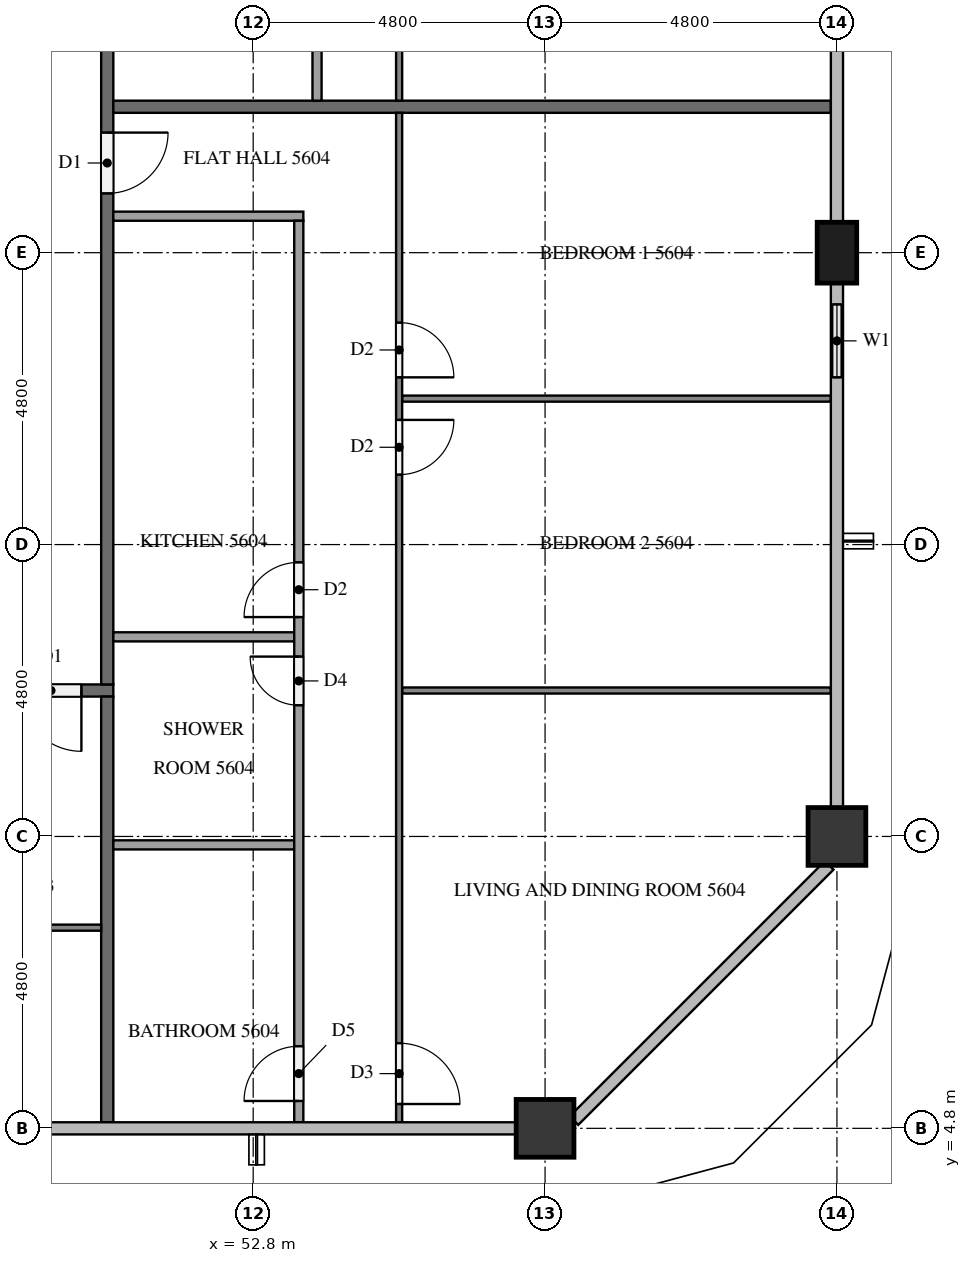
"""IFC4 building model, lengths in metres.
Left out: names, types, materials, properties, quantities, classifications, styles, units other than length and angle.
Written with IfcOpenShell. Run it as: python <this file> out.ifc"""

import sys

from ifc_helpers import new_model, si_unit, direction, frame, frame_2d, origin, origin_2d, place, context, subcontext, project, spatial, rectangle, extrude, element, fill, save


model = new_model("IFC4")
c1 = context("Model", 3, precision=1e-05, world=origin(), true_north=direction((0.0, 1.0)))
c2 = subcontext(c1, "Body", "Model", "MODEL_VIEW")
j1 = project(units=[si_unit("LENGTHUNIT", "METRE"), si_unit("PLANEANGLEUNIT", "RADIAN")], contexts=[c1])
p1 = place(None, origin())
s1 = spatial("IfcSite", under=j1, at=p1, CompositionType="ELEMENT")
p2 = place(p1, origin())
s2 = spatial("IfcBuilding", under=s1, at=p2, CompositionType="ELEMENT")
p3 = place(p2, frame((0.0, 0.0, 215.8)))
s3 = spatial("IfcBuildingStorey", under=s2, at=p3, CompositionType="ELEMENT", Elevation=215.8)
for number, where, z_axis, x_axis in (
    (1, (57.6, 4.8, 0.0), (0.0, 0.0, 1.0), (1.0, 0.0, 0.0)),
    (2, (62.4, 9.6, 0.0), (0.0, 0.0, 1.0), (1.0, 0.0, 0.0)),
):
    element("IfcColumn", number, at=place(p3, frame(where, z_axis=z_axis, x_axis=x_axis)), inside=s3, PredefinedType="COLUMN", context=c2, shape_type="SweptSolid", body=[
        extrude(rectangle(XDim=0.95, YDim=0.95, at=origin_2d()), origin(), (0.0, 0.0, 1.0), 3.2),
    ])
p4 = place(p3, frame((62.4, 19.2, 0.0), z_axis=(0.0, 0.0, 1.0), x_axis=(0.0, 1.0, 0.0)))
e3 = element("IfcColumn", 3, at=p4, inside=s3, PredefinedType="COLUMN", context=c2, shape_type="SweptSolid", body=[
    extrude(rectangle(XDim=1.0, YDim=0.65, at=origin_2d()), origin(), (0.0, 0.0, 1.0), 3.2),
])
p5 = place(p3, frame((62.4, 16.8, 0.0), z_axis=(0.0, 0.0, 1.0), x_axis=(0.0, 1.0, 0.0)))
e4 = element("IfcWall", 4, at=p5, inside=s3, PredefinedType="SOLIDWALL", context=c2, shape_type="SweptSolid", body=[
    extrude(rectangle(XDim=1.9, YDim=0.15, at=frame_2d((0.95, 0.0))), origin(), (0.0, 0.0, 1.0), 3.2),
])
p6 = place(p5, frame((0.35, 0.0, 0.9)))
e5 = element("IfcOpeningElement", 5, at=p6, cuts=e4, PredefinedType="OPENING", context=c2, shape_type="SweptSolid", body=[
    extrude(rectangle(XDim=1.2, YDim=1.4, at=frame_2d((0.6, 0.7))), frame((0.0, 0.085, 0.0), z_axis=(0.0, -1.0, 0.0), x_axis=(1.0, 0.0, 0.0)), (0.0, 0.0, 1.0), 0.17),
])
p7 = place(p3, frame((50.5, 12.0, 0.0), z_axis=(0.0, 0.0, 1.0), x_axis=(-1.0, 0.0, 0.0)))
e6 = element("IfcWall", 6, at=p7, inside=s3, PredefinedType="PARTITIONING", context=c2, shape_type="SweptSolid", body=[
    extrude(rectangle(XDim=38.6, YDim=0.2, at=frame_2d((19.3, 0.0))), origin(), (0.0, 0.0, 1.0), 3.2),
])
p8 = place(p7, frame((37.075, 0.0, 0.0)))
e7 = element("IfcOpeningElement", 7, at=p8, cuts=e6, PredefinedType="OPENING", context=c2, shape_type="SweptSolid", body=[
    extrude(rectangle(XDim=1.0, YDim=2.1, at=frame_2d((0.5, 1.05))), frame((0.0, 0.11, 0.0), z_axis=(0.0, -1.0, 0.0), x_axis=(1.0, 0.0, 0.0)), (0.0, 0.0, 1.0), 0.22),
])
p9 = place(p7, frame((20.275, 0.0, 0.0)))
e8 = element("IfcOpeningElement", 8, at=p9, cuts=e6, PredefinedType="OPENING", context=c2, shape_type="SweptSolid", body=[
    extrude(rectangle(XDim=1.0, YDim=2.1, at=frame_2d((0.5, 1.05))), frame((0.0, 0.11, 0.0), z_axis=(0.0, -1.0, 0.0), x_axis=(1.0, 0.0, 0.0)), (0.0, 0.0, 1.0), 0.22),
])
p10 = place(p7, frame((0.525, 0.0, 0.0)))
e9 = element("IfcOpeningElement", 9, at=p10, cuts=e6, PredefinedType="OPENING", context=c2, shape_type="SweptSolid", body=[
    extrude(rectangle(XDim=1.0, YDim=2.1, at=frame_2d((0.5, 1.05))), frame((0.0, 0.11, 0.0), z_axis=(0.0, -1.0, 0.0), x_axis=(1.0, 0.0, 0.0)), (0.0, 0.0, 1.0), 0.22),
])
p11 = place(p3, frame((50.4, 40.7, 0.0), z_axis=(0.0, 0.0, 1.0), x_axis=(0.0, -1.0, 0.0)))
e10 = element("IfcWall", 10, at=p11, inside=s3, PredefinedType="PARTITIONING", context=c2, shape_type="SweptSolid", body=[
    extrude(rectangle(XDim=28.6, YDim=0.2, at=frame_2d((14.3, 0.0))), origin(), (0.0, 0.0, 1.0), 3.2),
])
p12 = place(p11, frame((19.525, 0.0, 0.0)))
e11 = element("IfcOpeningElement", 11, at=p12, cuts=e10, PredefinedType="OPENING", context=c2, shape_type="SweptSolid", body=[
    extrude(rectangle(XDim=1.0, YDim=2.1, at=frame_2d((0.5, 1.05))), frame((0.0, 0.11, 0.0), z_axis=(0.0, -1.0, 0.0), x_axis=(1.0, 0.0, 0.0)), (0.0, 0.0, 1.0), 0.22),
])
p13 = place(p11, frame((7.525, 0.0, 0.0)))
e12 = element("IfcOpeningElement", 12, at=p13, cuts=e10, PredefinedType="OPENING", context=c2, shape_type="SweptSolid", body=[
    extrude(rectangle(XDim=1.0, YDim=2.1, at=frame_2d((0.5, 1.05))), frame((0.0, 0.11, 0.0), z_axis=(0.0, -1.0, 0.0), x_axis=(1.0, 0.0, 0.0)), (0.0, 0.0, 1.0), 0.22),
])
p14 = place(p11, frame((0.325, 0.0, 0.0)))
e13 = element("IfcOpeningElement", 13, at=p14, cuts=e10, PredefinedType="OPENING", context=c2, shape_type="SweptSolid", body=[
    extrude(rectangle(XDim=1.0, YDim=2.1, at=frame_2d((0.5, 1.05))), frame((0.0, 0.11, 0.0), z_axis=(0.0, -1.0, 0.0), x_axis=(1.0, 0.0, 0.0)), (0.0, 0.0, 1.0), 0.22),
])
p15 = place(p3, frame((50.4, 11.9, 0.0), z_axis=(0.0, 0.0, 1.0), x_axis=(0.0, -1.0, 0.0)))
e14 = element("IfcWall", 14, at=p15, inside=s3, PredefinedType="PARTITIONING", context=c2, shape_type="SweptSolid", body=[
    extrude(rectangle(XDim=7.0, YDim=0.2, at=frame_2d((3.5, 0.0))), origin(), (0.0, 0.0, 1.0), 3.2),
])
p16 = place(p3, frame((50.5, 21.6, 0.0), z_axis=(0.0, 0.0, 1.0), x_axis=(1.0, 0.0, 0.0)))
e15 = element("IfcWall", 15, at=p16, inside=s3, PredefinedType="PARTITIONING", context=c2, shape_type="SweptSolid", body=[
    extrude(rectangle(XDim=11.8, YDim=0.2, at=frame_2d((5.9, 0.0))), origin(), (0.0, 0.0, 1.0), 3.2),
])
p17 = place(p3, frame((50.3, 8.1, 0.0), z_axis=(0.0, 0.0, 1.0), x_axis=(-1.0, 0.0, 0.0)))
e16 = element("IfcWall", 16, at=p17, inside=s3, PredefinedType="PARTITIONING", context=c2, shape_type="SweptSolid", body=[
    extrude(rectangle(XDim=9.4, YDim=0.1, at=frame_2d((4.7, 0.0))), origin(), (0.0, 0.0, 1.0), 3.2),
])
p18 = place(p17, frame((3.35, 0.0, 0.0)))
e17 = element("IfcOpeningElement", 17, at=p18, cuts=e16, PredefinedType="OPENING", context=c2, shape_type="SweptSolid", body=[
    extrude(rectangle(XDim=1.0, YDim=2.1, at=frame_2d((0.5, 1.05))), frame((0.0, 0.06, 0.0), z_axis=(0.0, -1.0, 0.0), x_axis=(1.0, 0.0, 0.0)), (0.0, 0.0, 1.0), 0.12),
])
p19 = place(p17, frame((5.05, 0.0, 0.0)))
e18 = element("IfcOpeningElement", 18, at=p19, cuts=e16, PredefinedType="OPENING", context=c2, shape_type="SweptSolid", body=[
    extrude(rectangle(XDim=0.9, YDim=2.1, at=frame_2d((0.45, 1.05))), frame((0.0, 0.06, 0.0), z_axis=(0.0, -1.0, 0.0), x_axis=(1.0, 0.0, 0.0)), (0.0, 0.0, 1.0), 0.12),
])
for number, where, z_axis, x_axis in (
    (19, (55.25, 16.8, 0.0), (0.0, 0.0, 1.0), (1.0, 0.0, 0.0)),
    (20, (55.25, 12.0, 0.0), (0.0, 0.0, 1.0), (1.0, 0.0, 0.0)),
):
    element("IfcWall", number, at=place(p3, frame(where, z_axis=z_axis, x_axis=x_axis)), inside=s3, PredefinedType="PARTITIONING", context=c2, shape_type="SweptSolid", body=[
        extrude(rectangle(XDim=7.05, YDim=0.1, at=frame_2d((3.525, 0.0))), origin(), (0.0, 0.0, 1.0), 3.2),
    ])
p20 = place(p3, frame((55.2, 21.5, 0.0), z_axis=(0.0, 0.0, 1.0), x_axis=(0.0, -1.0, 0.0)))
e21 = element("IfcWall", 21, at=p20, inside=s3, PredefinedType="PARTITIONING", context=c2, shape_type="SweptSolid", body=[
    extrude(rectangle(XDim=16.6, YDim=0.1, at=frame_2d((8.3, 0.0))), origin(), (0.0, 0.0, 1.0), 3.2),
])
p21 = place(p20, frame((3.45, 0.0, 0.0)))
e22 = element("IfcOpeningElement", 22, at=p21, cuts=e21, PredefinedType="OPENING", context=c2, shape_type="SweptSolid", body=[
    extrude(rectangle(XDim=0.9, YDim=2.1, at=frame_2d((0.45, 1.05))), frame((0.0, 0.06, 0.0), z_axis=(0.0, -1.0, 0.0), x_axis=(1.0, 0.0, 0.0)), (0.0, 0.0, 1.0), 0.12),
])
p22 = place(p20, frame((5.05, 0.0, 0.0)))
e23 = element("IfcOpeningElement", 23, at=p22, cuts=e21, PredefinedType="OPENING", context=c2, shape_type="SweptSolid", body=[
    extrude(rectangle(XDim=0.9, YDim=2.1, at=frame_2d((0.45, 1.05))), frame((0.0, 0.06, 0.0), z_axis=(0.0, -1.0, 0.0), x_axis=(1.0, 0.0, 0.0)), (0.0, 0.0, 1.0), 0.12),
])
p23 = place(p20, frame((15.3, 0.0, 0.0)))
e24 = element("IfcOpeningElement", 24, at=p23, cuts=e21, PredefinedType="OPENING", context=c2, shape_type="SweptSolid", body=[
    extrude(rectangle(XDim=1.0, YDim=2.1, at=frame_2d((0.5, 1.05))), frame((0.0, 0.06, 0.0), z_axis=(0.0, -1.0, 0.0), x_axis=(1.0, 0.0, 0.0)), (0.0, 0.0, 1.0), 0.12),
])
for number, where, z_axis, x_axis in (
    (25, (50.5, 12.883, 0.0), (0.0, 0.0, 1.0), (1.0, 0.0, 0.0)),
    (26, (50.5, 9.461, 0.0), (0.0, 0.0, 1.0), (1.0, 0.0, 0.0)),
):
    element("IfcWall", number, at=place(p3, frame(where, z_axis=z_axis, x_axis=x_axis)), inside=s3, PredefinedType="PARTITIONING", context=c2, shape_type="SweptSolid", body=[
        extrude(rectangle(XDim=2.975, YDim=0.15, at=frame_2d((1.488, 0.0))), origin(), (0.0, 0.0, 1.0), 3.2),
    ])
p24 = place(p3, frame((50.5, 19.8, 0.0), z_axis=(0.0, 0.0, 1.0), x_axis=(1.0, 0.0, 0.0)))
e27 = element("IfcWall", 27, at=p24, inside=s3, PredefinedType="PARTITIONING", context=c2, shape_type="SweptSolid", body=[
    extrude(rectangle(XDim=3.125, YDim=0.15, at=frame_2d((1.562, 0.0))), origin(), (0.0, 0.0, 1.0), 3.2),
])
p25 = place(p3, frame((53.55, 4.9, 0.0), z_axis=(0.0, 0.0, 1.0), x_axis=(0.0, 1.0, 0.0)))
e28 = element("IfcWall", 28, at=p25, inside=s3, PredefinedType="PARTITIONING", context=c2, shape_type="SweptSolid", body=[
    extrude(rectangle(XDim=14.825, YDim=0.15, at=frame_2d((7.413, 0.0))), origin(), (0.0, 0.0, 1.0), 3.2),
])
p26 = place(p25, frame((8.308, 0.0, 0.0)))
e29 = element("IfcOpeningElement", 29, at=p26, cuts=e28, PredefinedType="OPENING", context=c2, shape_type="SweptSolid", body=[
    extrude(rectangle(XDim=0.9, YDim=2.1, at=frame_2d((0.45, 1.05))), frame((0.0, 0.085, 0.0), z_axis=(0.0, -1.0, 0.0), x_axis=(1.0, 0.0, 0.0)), (0.0, 0.0, 1.0), 0.17),
])
p27 = place(p25, frame((6.858, 0.0, 0.0)))
e30 = element("IfcOpeningElement", 30, at=p27, cuts=e28, PredefinedType="OPENING", context=c2, shape_type="SweptSolid", body=[
    extrude(rectangle(XDim=0.8, YDim=2.1, at=frame_2d((0.4, 1.05))), frame((0.0, 0.085, 0.0), z_axis=(0.0, -1.0, 0.0), x_axis=(1.0, 0.0, 0.0)), (0.0, 0.0, 1.0), 0.17),
])
p28 = place(p25, frame((0.35, 0.0, 0.0)))
e31 = element("IfcOpeningElement", 31, at=p28, cuts=e28, PredefinedType="OPENING", context=c2, shape_type="SweptSolid", body=[
    extrude(rectangle(XDim=0.9, YDim=2.1, at=frame_2d((0.45, 1.05))), frame((0.0, 0.085, 0.0), z_axis=(0.0, -1.0, 0.0), x_axis=(1.0, 0.0, 0.0)), (0.0, 0.0, 1.0), 0.17),
])
p29 = place(p3, frame((55.2, 33.5, 0.0), z_axis=(0.0, 0.0, 1.0), x_axis=(0.0, -1.0, 0.0)))
e32 = element("IfcWall", 32, at=p29, inside=s3, PredefinedType="PARTITIONING", context=c2, shape_type="SweptSolid", body=[
    extrude(rectangle(XDim=11.8, YDim=0.1, at=frame_2d((5.9, 0.0))), origin(), (0.0, 0.0, 1.0), 3.2),
])
p30 = place(p29, frame((5.75, 0.0, 0.0)))
e33 = element("IfcOpeningElement", 33, at=p30, cuts=e32, PredefinedType="OPENING", context=c2, shape_type="SweptSolid", body=[
    extrude(rectangle(XDim=1.0, YDim=2.1, at=frame_2d((0.5, 1.05))), frame((0.0, 0.06, 0.0), z_axis=(0.0, -1.0, 0.0), x_axis=(1.0, 0.0, 0.0)), (0.0, 0.0, 1.0), 0.12),
])
p31 = place(p29, frame((7.45, 0.0, 0.0)))
e34 = element("IfcOpeningElement", 34, at=p31, cuts=e32, PredefinedType="OPENING", context=c2, shape_type="SweptSolid", body=[
    extrude(rectangle(XDim=0.9, YDim=2.1, at=frame_2d((0.45, 1.05))), frame((0.0, 0.06, 0.0), z_axis=(0.0, -1.0, 0.0), x_axis=(1.0, 0.0, 0.0)), (0.0, 0.0, 1.0), 0.12),
])
p32 = place(p3, frame((53.85, 21.7, 0.0), z_axis=(0.0, 0.0, 1.0), x_axis=(0.0, 1.0, 0.0)))
e35 = element("IfcWall", 35, at=p32, inside=s3, PredefinedType="PARTITIONING", context=c2, shape_type="SweptSolid", body=[
    extrude(rectangle(XDim=10.025, YDim=0.15, at=frame_2d((5.013, 0.0))), origin(), (0.0, 0.0, 1.0), 3.2),
])
p33 = place(p32, frame((4.335, 0.0, 0.0)))
e36 = element("IfcOpeningElement", 36, at=p33, cuts=e35, PredefinedType="OPENING", context=c2, shape_type="SweptSolid", body=[
    extrude(rectangle(XDim=0.9, YDim=2.1, at=frame_2d((0.45, 1.05))), frame((0.0, 0.085, 0.0), z_axis=(0.0, -1.0, 0.0), x_axis=(1.0, 0.0, 0.0)), (0.0, 0.0, 1.0), 0.17),
])
p34 = place(p32, frame((2.885, 0.0, 0.0)))
e37 = element("IfcOpeningElement", 37, at=p34, cuts=e35, PredefinedType="OPENING", context=c2, shape_type="SweptSolid", body=[
    extrude(rectangle(XDim=0.8, YDim=2.1, at=frame_2d((0.4, 1.05))), frame((0.0, 0.085, 0.0), z_axis=(0.0, -1.0, 0.0), x_axis=(1.0, 0.0, 0.0)), (0.0, 0.0, 1.0), 0.17),
])
p35 = place(p6, origin())
e38 = element("IfcWindow", 38, at=p35, inside=s3, PartitioningType="SINGLE_PANEL", PredefinedType="WINDOW", context=c2, shape_type="SweptSolid", body=[
    extrude(rectangle(XDim=1.2, YDim=1.4, at=frame_2d((0.6, 0.7))), frame((0.0, 0.03, 0.0), z_axis=(0.0, -1.0, 0.0), x_axis=(1.0, 0.0, 0.0)), (0.0, 0.0, 1.0), 0.06),
])
fill(e5, e38)
p36 = place(p10, origin())
e39 = element("IfcDoor", 39, at=p36, inside=s3, OperationType="SINGLE_SWING_LEFT", PredefinedType="DOOR", context=c2, shape_type="SweptSolid", body=[
    extrude(rectangle(XDim=1.0, YDim=2.1, at=frame_2d((0.5, 1.05))), frame((0.0, 0.025, 0.0), z_axis=(0.0, -1.0, 0.0), x_axis=(1.0, 0.0, 0.0)), (0.0, 0.0, 1.0), 0.05),
])
fill(e9, e39)
p37 = place(p12, origin())
e40 = element("IfcDoor", 40, at=p37, inside=s3, OperationType="SINGLE_SWING_LEFT", PredefinedType="DOOR", context=c2, shape_type="SweptSolid", body=[
    extrude(rectangle(XDim=1.0, YDim=2.1, at=frame_2d((0.5, 1.05))), frame((0.0, 0.025, 0.0), z_axis=(0.0, -1.0, 0.0), x_axis=(1.0, 0.0, 0.0)), (0.0, 0.0, 1.0), 0.05),
])
fill(e11, e40)
p38 = place(p21, origin())
e41 = element("IfcDoor", 41, at=p38, inside=s3, OperationType="SINGLE_SWING_RIGHT", PredefinedType="DOOR", context=c2, shape_type="SweptSolid", body=[
    extrude(rectangle(XDim=0.9, YDim=2.1, at=frame_2d((0.45, 1.05))), frame((0.0, 0.025, 0.0), z_axis=(0.0, -1.0, 0.0), x_axis=(1.0, 0.0, 0.0)), (0.0, 0.0, 1.0), 0.05),
])
fill(e22, e41)
p39 = place(p22, origin())
e42 = element("IfcDoor", 42, at=p39, inside=s3, OperationType="SINGLE_SWING_LEFT", PredefinedType="DOOR", context=c2, shape_type="SweptSolid", body=[
    extrude(rectangle(XDim=0.9, YDim=2.1, at=frame_2d((0.45, 1.05))), frame((0.0, 0.025, 0.0), z_axis=(0.0, -1.0, 0.0), x_axis=(1.0, 0.0, 0.0)), (0.0, 0.0, 1.0), 0.05),
])
fill(e23, e42)
p40 = place(p23, origin())
e43 = element("IfcDoor", 43, at=p40, inside=s3, OperationType="SINGLE_SWING_RIGHT", PredefinedType="DOOR", context=c2, shape_type="SweptSolid", body=[
    extrude(rectangle(XDim=1.0, YDim=2.1, at=frame_2d((0.5, 1.05))), frame((0.0, 0.025, 0.0), z_axis=(0.0, -1.0, 0.0), x_axis=(1.0, 0.0, 0.0)), (0.0, 0.0, 1.0), 0.05),
])
fill(e24, e43)
p41 = place(p26, origin())
e44 = element("IfcDoor", 44, at=p41, inside=s3, OperationType="SINGLE_SWING_LEFT", PredefinedType="DOOR", context=c2, shape_type="SweptSolid", body=[
    extrude(rectangle(XDim=0.9, YDim=2.1, at=frame_2d((0.45, 1.05))), frame((0.0, 0.025, 0.0), z_axis=(0.0, -1.0, 0.0), x_axis=(1.0, 0.0, 0.0)), (0.0, 0.0, 1.0), 0.05),
])
fill(e29, e44)
p42 = place(p27, origin())
e45 = element("IfcDoor", 45, at=p42, inside=s3, OperationType="SINGLE_SWING_RIGHT", PredefinedType="DOOR", context=c2, shape_type="SweptSolid", body=[
    extrude(rectangle(XDim=0.8, YDim=2.1, at=frame_2d((0.4, 1.05))), frame((0.0, 0.025, 0.0), z_axis=(0.0, -1.0, 0.0), x_axis=(1.0, 0.0, 0.0)), (0.0, 0.0, 1.0), 0.05),
])
fill(e30, e45)
p43 = place(p28, origin())
e46 = element("IfcDoor", 46, at=p43, inside=s3, OperationType="SINGLE_SWING_LEFT", PredefinedType="DOOR", context=c2, shape_type="SweptSolid", body=[
    extrude(rectangle(XDim=0.9, YDim=2.1, at=frame_2d((0.45, 1.05))), frame((0.0, 0.025, 0.0), z_axis=(0.0, -1.0, 0.0), x_axis=(1.0, 0.0, 0.0)), (0.0, 0.0, 1.0), 0.05),
])
fill(e31, e46)
save(model, sys.argv[1])
